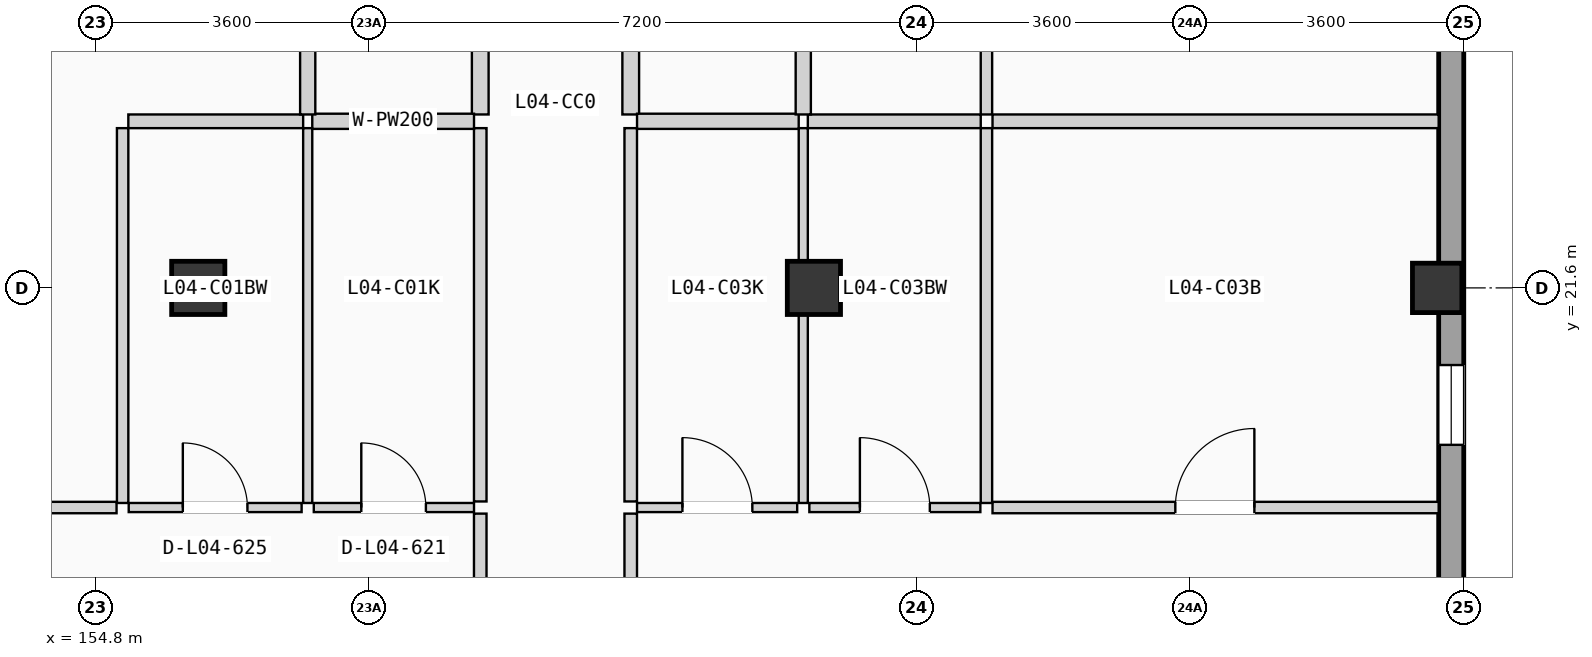
"""IFC4 building model, lengths in metres.
Left out: names, types, materials, properties, quantities, classifications, styles, units other than length and angle.
Written with IfcOpenShell. Run it as: python <this file> out.ifc"""

import sys

from ifc_helpers import new_model, si_unit, direction, frame, frame_2d, origin, origin_2d, place, context, subcontext, project, spatial, rectangle, extrude, element, fill, save


model = new_model("IFC4")
c1 = context("Model", 3, precision=1e-05, world=origin(), true_north=direction((0.0, 1.0)))
c2 = subcontext(c1, "Body", "Model", "MODEL_VIEW")
j1 = project(units=[si_unit("LENGTHUNIT", "METRE"), si_unit("PLANEANGLEUNIT", "RADIAN")], contexts=[c1])
p1 = place(None, origin())
s1 = spatial("IfcSite", under=j1, at=p1, CompositionType="ELEMENT")
p2 = place(p1, origin())
s2 = spatial("IfcBuilding", under=s1, at=p2, CompositionType="ELEMENT")
p3 = place(p2, frame((0.0, 0.0, 15.225)))
s3 = spatial("IfcBuildingStorey", under=s2, at=p3, CompositionType="ELEMENT", Elevation=15.225)
for number, where, z_axis, x_axis in (
    (1, (156.15, 21.6, 0.0), (0.0, 0.0, 1.0), (1.0, 0.0, 0.0)),
    (2, (164.25, 21.6, 0.0), (0.0, 0.0, 1.0), (1.0, 0.0, 0.0)),
):
    element("IfcColumn", number, at=place(p3, frame(where, z_axis=z_axis, x_axis=x_axis)), inside=s3, PredefinedType="COLUMN", context=c2, shape_type="SweptSolid", body=[
        extrude(rectangle(XDim=0.7, YDim=0.7, at=origin_2d()), origin(), (0.0, 0.0, 1.0), 3.15),
    ])
p4 = place(p3, frame((172.45, 21.6, 0.0), z_axis=(0.0, 0.0, 1.0), x_axis=(1.0, 0.0, 0.0)))
e3 = element("IfcColumn", 3, at=p4, inside=s3, PredefinedType="COLUMN", context=c2, shape_type="SweptSolid", body=[
    extrude(rectangle(XDim=0.65, YDim=0.65, at=origin_2d()), origin(), (0.0, 0.0, 1.0), 3.15),
])
p5 = place(p3, frame((172.635, 0.33, 0.0), z_axis=(0.0, 0.0, 1.0), x_axis=(0.0, 1.0, 0.0)))
e4 = element("IfcWall", 4, at=p5, inside=s3, PredefinedType="SOLIDWALL", context=c2, shape_type="SweptSolid", body=[
    extrude(rectangle(XDim=49.74, YDim=0.33, at=frame_2d((24.87, 0.0))), origin(), (0.0, 0.0, 1.0), 2.89),
])
p6 = place(p5, frame((15.845, 0.0, 0.85)))
e5 = element("IfcOpeningElement", 5, at=p6, cuts=e4, PredefinedType="OPENING", context=c2, shape_type="SweptSolid", body=[
    extrude(rectangle(XDim=0.95, YDim=1.2, at=frame_2d((0.475, 0.6))), frame((0.0, 0.175, 0.0), z_axis=(0.0, -1.0, 0.0), x_axis=(1.0, 0.0, 0.0)), (0.0, 0.0, 1.0), 0.35),
])
p7 = place(p5, frame((9.201, 0.0, 0.9)))
e6 = element("IfcOpeningElement", 6, at=p7, cuts=e4, PredefinedType="OPENING", context=c2, shape_type="SweptSolid", body=[
    extrude(rectangle(XDim=1.05, YDim=1.2, at=frame_2d((0.525, 0.6))), frame((0.0, 0.175, 0.0), z_axis=(0.0, -1.0, 0.0), x_axis=(1.0, 0.0, 0.0)), (0.0, 0.0, 1.0), 0.35),
])
p8 = place(p5, frame((19.205, 0.0, 0.855)))
e7 = element("IfcOpeningElement", 7, at=p8, cuts=e4, PredefinedType="OPENING", context=c2, shape_type="SweptSolid", body=[
    extrude(rectangle(XDim=1.05, YDim=1.35, at=frame_2d((0.525, 0.675))), frame((0.0, 0.175, 0.0), z_axis=(0.0, -1.0, 0.0), x_axis=(1.0, 0.0, 0.0)), (0.0, 0.0, 1.0), 0.35),
])
p9 = place(p5, frame((31.923, 0.0, 0.705)))
e8 = element("IfcOpeningElement", 8, at=p9, cuts=e4, PredefinedType="OPENING", context=c2, shape_type="SweptSolid", body=[
    extrude(rectangle(XDim=1.05, YDim=1.5, at=frame_2d((0.525, 0.75))), frame((0.0, 0.175, 0.0), z_axis=(0.0, -1.0, 0.0), x_axis=(1.0, 0.0, 0.0)), (0.0, 0.0, 1.0), 0.35),
])
p10 = place(p5, frame((25.351, 0.0, 0.555)))
e9 = element("IfcOpeningElement", 9, at=p10, cuts=e4, PredefinedType="OPENING", context=c2, shape_type="SweptSolid", body=[
    extrude(rectangle(XDim=1.05, YDim=1.65, at=frame_2d((0.525, 0.825))), frame((0.0, 0.175, 0.0), z_axis=(0.0, -1.0, 0.0), x_axis=(1.0, 0.0, 0.0)), (0.0, 0.0, 1.0), 0.35),
])
p11 = place(p5, frame((39.102, 0.0, 0.85)))
e10 = element("IfcOpeningElement", 10, at=p11, cuts=e4, PredefinedType="OPENING", context=c2, shape_type="SweptSolid", body=[
    extrude(rectangle(XDim=0.95, YDim=1.2, at=frame_2d((0.475, 0.6))), frame((0.0, 0.175, 0.0), z_axis=(0.0, -1.0, 0.0), x_axis=(1.0, 0.0, 0.0)), (0.0, 0.0, 1.0), 0.35),
])
p12 = place(p3, frame((159.86, 12.672, 0.0), z_axis=(0.0, 0.0, 1.0), x_axis=(0.0, 1.0, 0.0)))
e11 = element("IfcWall", 11, at=p12, inside=s3, PredefinedType="PARTITIONING", context=c2, shape_type="SweptSolid", body=[
    extrude(rectangle(XDim=5.958, YDim=0.165, at=frame_2d((2.979, 0.0))), origin(), (0.0, 0.0, 1.0), 2.87),
])
p13 = place(p12, frame((2.454, 0.0, 0.0)))
e12 = element("IfcOpeningElement", 12, at=p13, cuts=e11, PredefinedType="OPENING", context=c2, shape_type="SweptSolid", body=[
    extrude(rectangle(XDim=1.05, YDim=2.13, at=frame_2d((0.525, 1.065))), frame((0.0, 0.093, 0.0), z_axis=(0.0, -1.0, 0.0), x_axis=(1.0, 0.0, 0.0)), (0.0, 0.0, 1.0), 0.185),
])
p14 = place(p3, frame((159.86, 18.79, 0.0), z_axis=(0.0, 0.0, 1.0), x_axis=(0.0, 1.0, 0.0)))
e13 = element("IfcWall", 13, at=p14, inside=s3, PredefinedType="PARTITIONING", context=c2, shape_type="SweptSolid", body=[
    extrude(rectangle(XDim=4.912, YDim=0.165, at=frame_2d((2.456, 0.0))), origin(), (0.0, 0.0, 1.0), 2.87),
])
p15 = place(p3, frame((159.86, 23.882, 0.0), z_axis=(0.0, 0.0, 1.0), x_axis=(0.0, 1.0, 0.0)))
e14 = element("IfcWall", 14, at=p15, inside=s3, PredefinedType="PLUMBINGWALL", context=c2, shape_type="SweptSolid", body=[
    extrude(rectangle(XDim=5.83, YDim=0.22, at=frame_2d((2.915, 0.0))), origin(), (0.0, 0.0, 1.0), 2.87),
])
p16 = place(p3, frame((161.84, 12.672, 0.0), z_axis=(0.0, 0.0, 1.0), x_axis=(0.0, 1.0, 0.0)))
e15 = element("IfcWall", 15, at=p16, inside=s3, PredefinedType="PARTITIONING", context=c2, shape_type="SweptSolid", body=[
    extrude(rectangle(XDim=5.958, YDim=0.165, at=frame_2d((2.979, 0.0))), origin(), (0.0, 0.0, 1.0), 2.87),
])
p17 = place(p16, frame((2.454, 0.0, 0.0)))
e16 = element("IfcOpeningElement", 16, at=p17, cuts=e15, PredefinedType="OPENING", context=c2, shape_type="SweptSolid", body=[
    extrude(rectangle(XDim=1.05, YDim=2.13, at=frame_2d((0.525, 1.065))), frame((0.0, 0.093, 0.0), z_axis=(0.0, -1.0, 0.0), x_axis=(1.0, 0.0, 0.0)), (0.0, 0.0, 1.0), 0.185),
])
p18 = place(p3, frame((161.84, 18.79, 0.0), z_axis=(0.0, 0.0, 1.0), x_axis=(0.0, 1.0, 0.0)))
e17 = element("IfcWall", 17, at=p18, inside=s3, PredefinedType="PARTITIONING", context=c2, shape_type="SweptSolid", body=[
    extrude(rectangle(XDim=4.912, YDim=0.165, at=frame_2d((2.456, 0.0))), origin(), (0.0, 0.0, 1.0), 2.87),
])
p19 = place(p3, frame((161.84, 23.882, 0.0), z_axis=(0.0, 0.0, 1.0), x_axis=(0.0, 1.0, 0.0)))
e18 = element("IfcWall", 18, at=p19, inside=s3, PredefinedType="PLUMBINGWALL", context=c2, shape_type="SweptSolid", body=[
    extrude(rectangle(XDim=5.785, YDim=0.22, at=frame_2d((2.893, 0.0))), origin(), (0.0, 0.0, 1.0), 2.87),
])
p20 = place(p3, frame((157.67, 18.71, 0.0), z_axis=(0.0, 0.0, 1.0), x_axis=(1.0, 0.0, 0.0)))
e19 = element("IfcWall", 19, at=p20, inside=s3, PredefinedType="PARTITIONING", context=c2, shape_type="SweptSolid", body=[
    extrude(rectangle(XDim=2.108, YDim=0.12, at=frame_2d((1.054, 0.0))), origin(), (0.0, 0.0, 1.0), 2.87),
])
p21 = place(p20, frame((0.625, 0.0, 0.0)))
e20 = element("IfcOpeningElement", 20, at=p21, cuts=e19, PredefinedType="OPENING", context=c2, shape_type="SweptSolid", body=[
    extrude(rectangle(XDim=0.85, YDim=2.01, at=frame_2d((0.425, 1.005))), frame((0.0, 0.07, 0.0), z_axis=(0.0, -1.0, 0.0), x_axis=(1.0, 0.0, 0.0)), (0.0, 0.0, 1.0), 0.14),
])
p22 = place(p3, frame((147.93, 18.71, 0.0), z_axis=(0.0, 0.0, 1.0), x_axis=(1.0, 0.0, 0.0)))
e21 = element("IfcWall", 21, at=p22, inside=s3, PredefinedType="PARTITIONING", context=c2, shape_type="SweptSolid", body=[
    extrude(rectangle(XDim=7.145, YDim=0.15, at=frame_2d((3.573, 0.0))), origin(), (0.0, 0.0, 1.0), 2.87),
])
p23 = place(p22, frame((3.132, 0.0, 0.0)))
e22 = element("IfcOpeningElement", 22, at=p23, cuts=e21, PredefinedType="OPENING", context=c2, shape_type="SweptSolid", body=[
    extrude(rectangle(XDim=0.9, YDim=2.04, at=frame_2d((0.45, 1.02))), frame((0.0, 0.085, 0.0), z_axis=(0.0, -1.0, 0.0), x_axis=(1.0, 0.0, 0.0)), (0.0, 0.0, 1.0), 0.17),
])
p24 = place(p3, frame((155.235, 18.71, 0.0), z_axis=(0.0, 0.0, 1.0), x_axis=(1.0, 0.0, 0.0)))
e23 = element("IfcWall", 23, at=p24, inside=s3, PredefinedType="PARTITIONING", context=c2, shape_type="SweptSolid", body=[
    extrude(rectangle(XDim=2.275, YDim=0.12, at=frame_2d((1.137, 0.0))), origin(), (0.0, 0.0, 1.0), 2.87),
])
p25 = place(p24, frame((0.712, 0.0, 0.0)))
e24 = element("IfcOpeningElement", 24, at=p25, cuts=e23, PredefinedType="OPENING", context=c2, shape_type="SweptSolid", body=[
    extrude(rectangle(XDim=0.85, YDim=2.01, at=frame_2d((0.425, 1.005))), frame((0.0, 0.07, 0.0), z_axis=(0.0, -1.0, 0.0), x_axis=(1.0, 0.0, 0.0)), (0.0, 0.0, 1.0), 0.14),
])
p26 = place(p3, frame((157.59, 18.77, 0.0), z_axis=(0.0, 0.0, 1.0), x_axis=(0.0, 1.0, 0.0)))
e25 = element("IfcWall", 25, at=p26, inside=s3, PredefinedType="PARTITIONING", context=c2, shape_type="SweptSolid", body=[
    extrude(rectangle(XDim=4.932, YDim=0.12, at=frame_2d((2.466, 0.0))), origin(), (0.0, 0.0, 1.0), 2.87),
])
p27 = place(p3, frame((157.65, 23.792, 0.0), z_axis=(0.0, 0.0, 1.0), x_axis=(1.0, 0.0, 0.0)))
e26 = element("IfcWall", 26, at=p27, inside=s3, PredefinedType="PLUMBINGWALL", context=c2, shape_type="SweptSolid", body=[
    extrude(rectangle(XDim=2.128, YDim=0.2, at=frame_2d((1.064, 0.0))), origin(), (0.0, 0.0, 1.0), 2.87),
])
p28 = place(p3, frame((155.155, 18.77, 0.0), z_axis=(0.0, 0.0, 1.0), x_axis=(0.0, 1.0, 0.0)))
e27 = element("IfcWall", 27, at=p28, inside=s3, PredefinedType="PARTITIONING", context=c2, shape_type="SweptSolid", body=[
    extrude(rectangle(XDim=4.932, YDim=0.15, at=frame_2d((2.466, 0.0))), origin(), (0.0, 0.0, 1.0), 2.87),
])
p29 = place(p3, frame((155.23, 23.792, 0.0), z_axis=(0.0, 0.0, 1.0), x_axis=(1.0, 0.0, 0.0)))
e28 = element("IfcWall", 28, at=p29, inside=s3, PredefinedType="PARTITIONING", context=c2, shape_type="SweptSolid", body=[
    extrude(rectangle(XDim=2.3, YDim=0.18, at=frame_2d((1.15, 0.0))), origin(), (0.0, 0.0, 1.0), 2.87),
])
p30 = place(p3, frame((157.59, 23.882, 0.0), z_axis=(0.0, 0.0, 1.0), x_axis=(0.0, 1.0, 0.0)))
e29 = element("IfcWall", 29, at=p30, inside=s3, PredefinedType="PLUMBINGWALL", context=c2, shape_type="SweptSolid", body=[
    extrude(rectangle(XDim=5.85, YDim=0.2, at=frame_2d((2.925, 0.0))), origin(), (0.0, 0.0, 1.0), 2.87),
])
p31 = place(p30, frame((2.49, 0.0, 0.0)))
e30 = element("IfcOpeningElement", 30, at=p31, cuts=e29, PredefinedType="OPENING", context=c2, shape_type="SweptSolid", body=[
    extrude(rectangle(XDim=0.85, YDim=2.01, at=frame_2d((0.425, 1.005))), frame((0.0, 0.11, 0.0), z_axis=(0.0, -1.0, 0.0), x_axis=(1.0, 0.0, 0.0)), (0.0, 0.0, 1.0), 0.22),
])
p32 = place(p3, frame((161.923, 18.71, 0.0), z_axis=(0.0, 0.0, 1.0), x_axis=(1.0, 0.0, 0.0)))
e31 = element("IfcWall", 31, at=p32, inside=s3, PredefinedType="PARTITIONING", context=c2, shape_type="SweptSolid", body=[
    extrude(rectangle(XDim=2.107, YDim=0.12, at=frame_2d((1.053, 0.0))), origin(), (0.0, 0.0, 1.0), 2.87),
])
p33 = place(p32, frame((0.597, 0.0, 0.0)))
e32 = element("IfcOpeningElement", 32, at=p33, cuts=e31, PredefinedType="OPENING", context=c2, shape_type="SweptSolid", body=[
    extrude(rectangle(XDim=0.92, YDim=2.02, at=frame_2d((0.46, 1.01))), frame((0.0, 0.07, 0.0), z_axis=(0.0, -1.0, 0.0), x_axis=(1.0, 0.0, 0.0)), (0.0, 0.0, 1.0), 0.14),
])
p34 = place(p3, frame((166.6, 18.71, 0.0), z_axis=(0.0, 0.0, 1.0), x_axis=(1.0, 0.0, 0.0)))
e33 = element("IfcWall", 33, at=p34, inside=s3, PredefinedType="PARTITIONING", context=c2, shape_type="SweptSolid", body=[
    extrude(rectangle(XDim=5.87, YDim=0.15, at=frame_2d((2.935, 0.0))), origin(), (0.0, 0.0, 1.0), 2.87),
])
p35 = place(p34, frame((2.405, 0.0, 0.0)))
e34 = element("IfcOpeningElement", 34, at=p35, cuts=e33, PredefinedType="OPENING", context=c2, shape_type="SweptSolid", body=[
    extrude(rectangle(XDim=1.04, YDim=2.08, at=frame_2d((0.52, 1.04))), frame((0.0, 0.085, 0.0), z_axis=(0.0, -1.0, 0.0), x_axis=(1.0, 0.0, 0.0)), (0.0, 0.0, 1.0), 0.17),
])
p36 = place(p3, frame((164.19, 18.71, 0.0), z_axis=(0.0, 0.0, 1.0), x_axis=(1.0, 0.0, 0.0)))
e35 = element("IfcWall", 35, at=p36, inside=s3, PredefinedType="PARTITIONING", context=c2, shape_type="SweptSolid", body=[
    extrude(rectangle(XDim=2.25, YDim=0.12, at=frame_2d((1.125, 0.0))), origin(), (0.0, 0.0, 1.0), 2.87),
])
p37 = place(p36, frame((0.665, 0.0, 0.0)))
e36 = element("IfcOpeningElement", 36, at=p37, cuts=e35, PredefinedType="OPENING", context=c2, shape_type="SweptSolid", body=[
    extrude(rectangle(XDim=0.92, YDim=2.02, at=frame_2d((0.46, 1.01))), frame((0.0, 0.07, 0.0), z_axis=(0.0, -1.0, 0.0), x_axis=(1.0, 0.0, 0.0)), (0.0, 0.0, 1.0), 0.14),
])
p38 = place(p3, frame((164.11, 18.77, 0.0), z_axis=(0.0, 0.0, 1.0), x_axis=(0.0, 1.0, 0.0)))
e37 = element("IfcWall", 37, at=p38, inside=s3, PredefinedType="PARTITIONING", context=c2, shape_type="SweptSolid", body=[
    extrude(rectangle(XDim=4.932, YDim=0.12, at=frame_2d((2.466, 0.0))), origin(), (0.0, 0.0, 1.0), 2.87),
])
p39 = place(p3, frame((161.923, 23.792, 0.0), z_axis=(0.0, 0.0, 1.0), x_axis=(1.0, 0.0, 0.0)))
e38 = element("IfcWall", 38, at=p39, inside=s3, PredefinedType="PLUMBINGWALL", context=c2, shape_type="SweptSolid", body=[
    extrude(rectangle(XDim=2.127, YDim=0.2, at=frame_2d((1.063, 0.0))), origin(), (0.0, 0.0, 1.0), 2.87),
])
p40 = place(p3, frame((166.52, 18.77, 0.0), z_axis=(0.0, 0.0, 1.0), x_axis=(0.0, 1.0, 0.0)))
e39 = element("IfcWall", 39, at=p40, inside=s3, PredefinedType="PARTITIONING", context=c2, shape_type="SweptSolid", body=[
    extrude(rectangle(XDim=4.932, YDim=0.15, at=frame_2d((2.466, 0.0))), origin(), (0.0, 0.0, 1.0), 2.87),
])
p41 = place(p3, frame((166.6, 23.792, 0.0), z_axis=(0.0, 0.0, 1.0), x_axis=(1.0, 0.0, 0.0)))
e40 = element("IfcWall", 40, at=p41, inside=s3, PredefinedType="PARTITIONING", context=c2, shape_type="SweptSolid", body=[
    extrude(rectangle(XDim=5.87, YDim=0.18, at=frame_2d((2.935, 0.0))), origin(), (0.0, 0.0, 1.0), 2.87),
])
p42 = place(p3, frame((164.17, 23.792, 0.0), z_axis=(0.0, 0.0, 1.0), x_axis=(1.0, 0.0, 0.0)))
e41 = element("IfcWall", 41, at=p42, inside=s3, PredefinedType="PARTITIONING", context=c2, shape_type="SweptSolid", body=[
    extrude(rectangle(XDim=2.275, YDim=0.18, at=frame_2d((1.138, 0.0))), origin(), (0.0, 0.0, 1.0), 2.87),
])
p43 = place(p3, frame((164.11, 23.882, 0.0), z_axis=(0.0, 0.0, 1.0), x_axis=(0.0, 1.0, 0.0)))
e42 = element("IfcWall", 42, at=p43, inside=s3, PredefinedType="PLUMBINGWALL", context=c2, shape_type="SweptSolid", body=[
    extrude(rectangle(XDim=5.805, YDim=0.2, at=frame_2d((2.902, 0.0))), origin(), (0.0, 0.0, 1.0), 2.87),
])
p44 = place(p43, frame((2.468, 0.0, 0.0)))
e43 = element("IfcOpeningElement", 43, at=p44, cuts=e42, PredefinedType="OPENING", context=c2, shape_type="SweptSolid", body=[
    extrude(rectangle(XDim=0.85, YDim=2.01, at=frame_2d((0.425, 1.005))), frame((0.0, 0.11, 0.0), z_axis=(0.0, -1.0, 0.0), x_axis=(1.0, 0.0, 0.0)), (0.0, 0.0, 1.0), 0.22),
])
p45 = place(p3, frame((166.52, 23.882, 0.0), z_axis=(0.0, 0.0, 1.0), x_axis=(0.0, 1.0, 0.0)))
e44 = element("IfcWall", 44, at=p45, inside=s3, PredefinedType="PARTITIONING", context=c2, shape_type="SweptSolid", body=[
    extrude(rectangle(XDim=5.805, YDim=0.15, at=frame_2d((2.902, 0.0))), origin(), (0.0, 0.0, 1.0), 2.87),
])
p46 = place(p8, origin())
e45 = element("IfcWindow", 45, at=p46, inside=s3, PartitioningType="SINGLE_PANEL", PredefinedType="WINDOW", context=c2, shape_type="SweptSolid", body=[
    extrude(rectangle(XDim=1.05, YDim=1.35, at=frame_2d((0.525, 0.675))), frame((0.0, 0.03, 0.0), z_axis=(0.0, -1.0, 0.0), x_axis=(1.0, 0.0, 0.0)), (0.0, 0.0, 1.0), 0.06),
])
fill(e7, e45)
p47 = place(p21, origin())
e46 = element("IfcDoor", 46, at=p47, inside=s3, OperationType="SINGLE_SWING_LEFT", PredefinedType="DOOR", context=c2, shape_type="SweptSolid", body=[
    extrude(rectangle(XDim=0.85, YDim=2.01, at=frame_2d((0.425, 1.005))), frame((0.0, 0.025, 0.0), z_axis=(0.0, -1.0, 0.0), x_axis=(1.0, 0.0, 0.0)), (0.0, 0.0, 1.0), 0.05),
])
fill(e20, e46)
p48 = place(p25, origin())
e47 = element("IfcDoor", 47, at=p48, inside=s3, OperationType="SINGLE_SWING_LEFT", PredefinedType="DOOR", context=c2, shape_type="SweptSolid", body=[
    extrude(rectangle(XDim=0.85, YDim=2.01, at=frame_2d((0.425, 1.005))), frame((0.0, 0.025, 0.0), z_axis=(0.0, -1.0, 0.0), x_axis=(1.0, 0.0, 0.0)), (0.0, 0.0, 1.0), 0.05),
])
fill(e24, e47)
p49 = place(p33, origin())
e48 = element("IfcDoor", 48, at=p49, inside=s3, OperationType="SINGLE_SWING_LEFT", PredefinedType="DOOR", context=c2, shape_type="SweptSolid", body=[
    extrude(rectangle(XDim=0.92, YDim=2.02, at=frame_2d((0.46, 1.01))), frame((0.0, 0.025, 0.0), z_axis=(0.0, -1.0, 0.0), x_axis=(1.0, 0.0, 0.0)), (0.0, 0.0, 1.0), 0.05),
])
fill(e32, e48)
p50 = place(p35, origin())
e49 = element("IfcDoor", 49, at=p50, inside=s3, OperationType="SINGLE_SWING_RIGHT", PredefinedType="DOOR", context=c2, shape_type="SweptSolid", body=[
    extrude(rectangle(XDim=1.04, YDim=2.08, at=frame_2d((0.52, 1.04))), frame((0.0, 0.025, 0.0), z_axis=(0.0, -1.0, 0.0), x_axis=(1.0, 0.0, 0.0)), (0.0, 0.0, 1.0), 0.05),
])
fill(e34, e49)
p51 = place(p37, origin())
e50 = element("IfcDoor", 50, at=p51, inside=s3, OperationType="SINGLE_SWING_LEFT", PredefinedType="DOOR", context=c2, shape_type="SweptSolid", body=[
    extrude(rectangle(XDim=0.92, YDim=2.02, at=frame_2d((0.46, 1.01))), frame((0.0, 0.025, 0.0), z_axis=(0.0, -1.0, 0.0), x_axis=(1.0, 0.0, 0.0)), (0.0, 0.0, 1.0), 0.05),
])
fill(e36, e50)
save(model, sys.argv[1])
